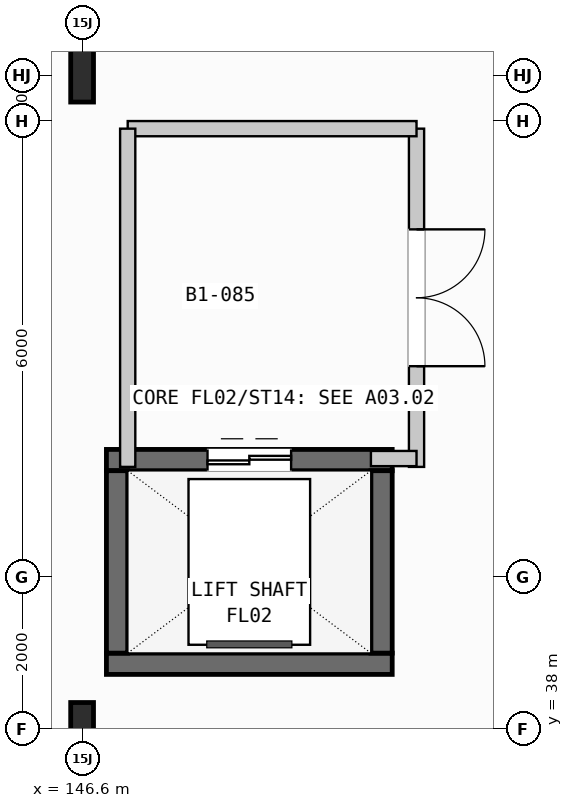
"""IFC4 building model, lengths in metres.
Left out: names, types, materials, properties, quantities, classifications, styles, units other than length and angle.
Written with IfcOpenShell. Run it as: python <this file> out.ifc"""

import sys

from ifc_helpers import new_model, si_unit, direction, frame, frame_2d, origin, origin_2d, place, context, subcontext, project, spatial, rectangle, i_section, extrude, element, fill, save


model = new_model("IFC4")
c1 = context("Model", 3, precision=1e-05, world=origin(), true_north=direction((0.0, 1.0)))
c2 = subcontext(c1, "Body", "Model", "MODEL_VIEW")
j1 = project(units=[si_unit("LENGTHUNIT", "METRE"), si_unit("PLANEANGLEUNIT", "RADIAN")], contexts=[c1])
p1 = place(None, origin())
s1 = spatial("IfcSite", under=j1, at=p1, CompositionType="ELEMENT")
p2 = place(p1, origin())
s2 = spatial("IfcBuilding", under=s1, at=p2, CompositionType="ELEMENT")
p3 = place(p2, frame((0.0, 0.0, -5.4)))
s3 = spatial("IfcBuildingStorey", under=s2, at=p3, CompositionType="ELEMENT", Elevation=-5.4)
for number, where, z_axis, x_axis in (
    (1, (146.6, 38.0, 0.0), (0.0, 0.0, 1.0), (1.0, 0.0, 0.0)),
    (2, (146.6, 46.6, 0.0), (0.0, 0.0, 1.0), (1.0, 0.0, 0.0)),
):
    element("IfcColumn", number, at=place(p3, frame(where, z_axis=z_axis, x_axis=x_axis)), inside=s3, PredefinedType="COLUMN", context=c2, shape_type="SweptSolid", body=[
        extrude(i_section(OverallWidth=0.3, OverallDepth=0.7, WebThickness=0.017, FlangeThickness=0.032, FilletRadius=0.027, at=origin_2d()), origin(), (0.0, 0.0, 1.0), 5.4),
    ])
p4 = place(p3, frame((146.92, 38.86, 0.0), z_axis=(0.0, 0.0, 1.0), x_axis=(1.0, 0.0, 0.0)))
e3 = element("IfcWall", 3, at=p4, inside=s3, PredefinedType="SHEAR", context=c2, shape_type="SweptSolid", body=[
    extrude(rectangle(XDim=3.76, YDim=0.28, at=frame_2d((1.88, 0.0))), origin(), (0.0, 0.0, 1.0), 5.4),
])
p5 = place(p3, frame((146.92, 41.54, 0.0), z_axis=(0.0, 0.0, 1.0), x_axis=(1.0, 0.0, 0.0)))
e4 = element("IfcWall", 4, at=p5, inside=s3, PredefinedType="SHEAR", context=c2, shape_type="SweptSolid", body=[
    extrude(rectangle(XDim=3.76, YDim=0.28, at=frame_2d((1.88, 0.0))), origin(), (0.0, 0.0, 1.0), 5.4),
])
p6 = place(p5, frame((1.33, 0.0, 0.0)))
e5 = element("IfcOpeningElement", 5, at=p6, cuts=e4, PredefinedType="OPENING", context=c2, shape_type="SweptSolid", body=[
    extrude(rectangle(XDim=1.1, YDim=2.15, at=frame_2d((0.55, 1.075))), frame((0.0, 0.15, 0.0), z_axis=(0.0, -1.0, 0.0), x_axis=(1.0, 0.0, 0.0)), (0.0, 0.0, 1.0), 0.3),
])
for number, where, z_axis, x_axis in (
    (6, (147.06, 39.0, 0.0), (0.0, 0.0, 1.0), (0.0, 1.0, 0.0)),
    (7, (150.54, 39.0, 0.0), (0.0, 0.0, 1.0), (0.0, 1.0, 0.0)),
):
    element("IfcWall", number, at=place(p3, frame(where, z_axis=z_axis, x_axis=x_axis)), inside=s3, PredefinedType="SHEAR", context=c2, shape_type="SweptSolid", body=[
        extrude(rectangle(XDim=2.4, YDim=0.28, at=frame_2d((1.2, 0.0))), origin(), (0.0, 0.0, 1.0), 5.4),
    ])
p7 = place(p3, frame((151.0, 41.45, 0.0), z_axis=(0.0, 0.0, 1.0), x_axis=(0.0, 1.0, 0.0)))
e8 = element("IfcWall", 8, at=p7, inside=s3, PredefinedType="PARTITIONING", context=c2, shape_type="SweptSolid", body=[
    extrude(rectangle(XDim=4.45, YDim=0.2, at=frame_2d((2.225, 0.0))), origin(), (0.0, 0.0, 1.0), 4.0),
])
p8 = place(p7, frame((1.325, 0.0, 0.0)))
e9 = element("IfcOpeningElement", 9, at=p8, cuts=e8, PredefinedType="OPENING", context=c2, shape_type="SweptSolid", body=[
    extrude(rectangle(XDim=1.8, YDim=2.2, at=frame_2d((0.9, 1.1))), frame((0.0, 0.11, 0.0), z_axis=(0.0, -1.0, 0.0), x_axis=(1.0, 0.0, 0.0)), (0.0, 0.0, 1.0), 0.22),
])
p9 = place(p3, frame((147.2, 45.9, 0.0), z_axis=(0.0, 0.0, 1.0), x_axis=(1.0, 0.0, 0.0)))
e10 = element("IfcWall", 10, at=p9, inside=s3, PredefinedType="PARTITIONING", context=c2, shape_type="SweptSolid", body=[
    extrude(rectangle(XDim=3.8, YDim=0.2, at=frame_2d((1.9, 0.0))), origin(), (0.0, 0.0, 1.0), 4.0),
])
p10 = place(p3, frame((147.2, 41.45, 0.0), z_axis=(0.0, 0.0, 1.0), x_axis=(0.0, 1.0, 0.0)))
e11 = element("IfcWall", 11, at=p10, inside=s3, PredefinedType="PARTITIONING", context=c2, shape_type="SweptSolid", body=[
    extrude(rectangle(XDim=4.45, YDim=0.2, at=frame_2d((2.225, 0.0))), origin(), (0.0, 0.0, 1.0), 4.0),
])
p11 = place(p3, frame((150.4, 41.56, 0.0), z_axis=(0.0, 0.0, 1.0), x_axis=(1.0, 0.0, 0.0)))
e12 = element("IfcWall", 12, at=p11, inside=s3, PredefinedType="PARTITIONING", context=c2, shape_type="SweptSolid", body=[
    extrude(rectangle(XDim=0.6, YDim=0.2, at=frame_2d((0.3, 0.0))), origin(), (0.0, 0.0, 1.0), 4.0),
])
p12 = place(p6, origin())
e13 = element("IfcDoor", 13, at=p12, inside=s3, OperationType="DOUBLE_DOOR_SLIDING", PredefinedType="DOOR", context=c2, shape_type="SweptSolid", body=[
    extrude(rectangle(XDim=1.1, YDim=2.15, at=frame_2d((0.55, 1.075))), frame((0.0, 0.025, 0.0), z_axis=(0.0, -1.0, 0.0), x_axis=(1.0, 0.0, 0.0)), (0.0, 0.0, 1.0), 0.05),
])
fill(e5, e13)
p13 = place(p8, frame((1.8, 0.0, 0.0), z_axis=(0.0, 0.0, 1.0), x_axis=(-1.0, 0.0, 0.0)))
e14 = element("IfcDoor", 14, at=p13, inside=s3, OperationType="DOUBLE_DOOR_SINGLE_SWING", PredefinedType="DOOR", context=c2, shape_type="SweptSolid", body=[
    extrude(rectangle(XDim=1.8, YDim=2.2, at=frame_2d((0.9, 1.1))), frame((0.0, 0.025, 0.0), z_axis=(0.0, -1.0, 0.0), x_axis=(1.0, 0.0, 0.0)), (0.0, 0.0, 1.0), 0.05),
])
fill(e9, e14)
save(model, sys.argv[1])
